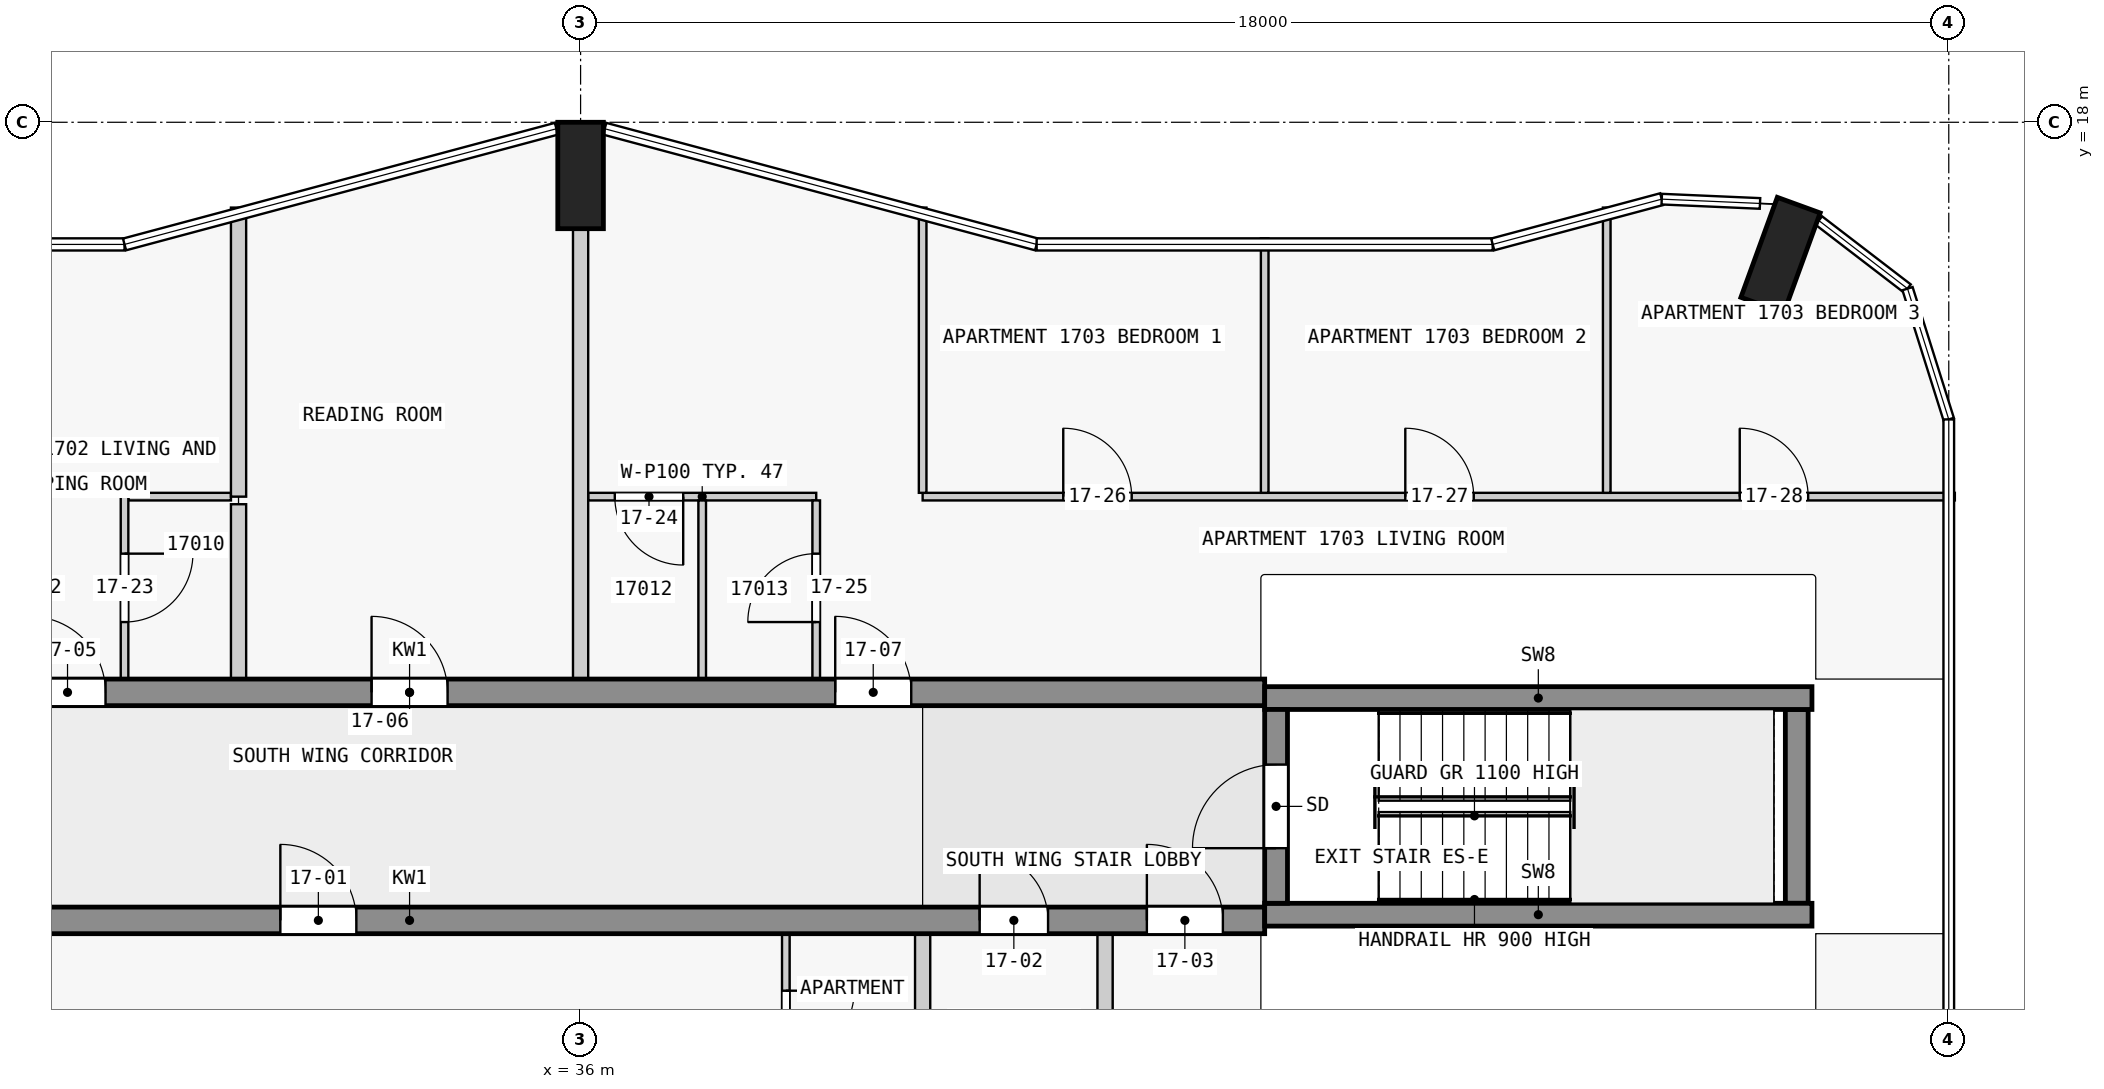
"""IFC4 building model, lengths in metres.
Left out: names, types, materials, properties, quantities, classifications, styles, units other than length and angle.
Written with IfcOpenShell. Run it as: python <this file> out.ifc"""

import sys

from ifc_helpers import new_model, si_unit, direction, frame, frame_2d, origin, origin_2d, place, context, subcontext, project, spatial, rectangle, extrude, element, fill, save


model = new_model("IFC4")
c1 = context("Model", 3, precision=1e-05, world=origin(), true_north=direction((0.0, 1.0)))
c2 = subcontext(c1, "Body", "Model", "MODEL_VIEW")
j1 = project(units=[si_unit("LENGTHUNIT", "METRE"), si_unit("PLANEANGLEUNIT", "RADIAN")], contexts=[c1])
p1 = place(None, origin())
s1 = spatial("IfcSite", under=j1, at=p1, CompositionType="ELEMENT")
p2 = place(p1, origin())
s2 = spatial("IfcBuilding", under=s1, at=p2, CompositionType="ELEMENT")
p3 = place(p2, frame((0.0, 0.0, 68.8)))
s3 = spatial("IfcBuildingStorey", under=s2, at=p3, CompositionType="ELEMENT", Elevation=68.8)
for number, where, z_axis, x_axis in (
    (1, (51.787, 16.252, 0.0), (0.0, 0.0, 1.0), (-0.94, 0.342, 0.0)),
    (2, (36.0, 17.3, 0.0), (0.0, 0.0, 1.0), (1.0, 0.0, 0.0)),
):
    element("IfcColumn", number, at=place(p3, frame(where, z_axis=z_axis, x_axis=x_axis)), inside=s3, PredefinedType="COLUMN", context=c2, shape_type="SweptSolid", body=[
        extrude(rectangle(XDim=0.6, YDim=1.4, at=origin_2d()), origin(), (0.0, 0.0, 1.0), 3.5),
    ])
p4 = place(p3, frame((45.15, 7.725, 0.0), z_axis=(0.0, 0.0, 1.0), x_axis=(0.0, 1.0, 0.0)))
e3 = element("IfcWall", 3, at=p4, inside=s3, PredefinedType="SHEAR", context=c2, shape_type="SweptSolid", body=[
    extrude(rectangle(XDim=2.55, YDim=0.3, at=frame_2d((1.275, 0.0))), origin(), (0.0, 0.0, 1.0), 3.5),
])
p5 = place(p4, frame((0.725, 0.0, 0.0)))
e4 = element("IfcOpeningElement", 4, at=p5, cuts=e3, PredefinedType="OPENING", context=c2, shape_type="SweptSolid", body=[
    extrude(rectangle(XDim=1.1, YDim=2.1, at=frame_2d((0.55, 1.05))), frame((0.0, 0.16, 0.0), z_axis=(0.0, -1.0, 0.0), x_axis=(1.0, 0.0, 0.0)), (0.0, 0.0, 1.0), 0.32),
])
p6 = place(p3, frame((52.0, 7.725, 0.0), z_axis=(0.0, 0.0, 1.0), x_axis=(0.0, 1.0, 0.0)))
e5 = element("IfcWall", 5, at=p6, inside=s3, PredefinedType="SHEAR", context=c2, shape_type="SweptSolid", body=[
    extrude(rectangle(XDim=2.55, YDim=0.3, at=frame_2d((1.275, 0.0))), origin(), (0.0, 0.0, 1.0), 3.5),
])
for number, where, z_axis, x_axis in (
    (6, (45.0, 7.575, 0.0), (0.0, 0.0, 1.0), (1.0, 0.0, 0.0)),
    (7, (45.0, 10.425, 0.0), (0.0, 0.0, 1.0), (1.0, 0.0, 0.0)),
):
    element("IfcWall", number, at=place(p3, frame(where, z_axis=z_axis, x_axis=x_axis)), inside=s3, PredefinedType="SHEAR", context=c2, shape_type="SweptSolid", body=[
        extrude(rectangle(XDim=7.2, YDim=0.3, at=frame_2d((3.6, 0.0))), origin(), (0.0, 0.0, 1.0), 3.5),
    ])
p7 = place(p3, frame((22.5, 7.5, 0.0), z_axis=(0.0, 0.0, 1.0), x_axis=(1.0, 0.0, 0.0)))
e8 = element("IfcWall", 8, at=p7, inside=s3, PredefinedType="SHEAR", context=c2, shape_type="SweptSolid", body=[
    extrude(rectangle(XDim=22.5, YDim=0.35, at=frame_2d((11.25, 0.0))), origin(), (0.0, 0.0, 1.0), 3.2),
])
p8 = place(p7, frame((9.55, 0.0, 0.0)))
e9 = element("IfcOpeningElement", 9, at=p8, cuts=e8, PredefinedType="OPENING", context=c2, shape_type="SweptSolid", body=[
    extrude(rectangle(XDim=1.0, YDim=2.1, at=frame_2d((0.5, 1.05))), frame((0.0, 0.185, 0.0), z_axis=(0.0, -1.0, 0.0), x_axis=(1.0, 0.0, 0.0)), (0.0, 0.0, 1.0), 0.37),
])
p9 = place(p7, frame((18.75, 0.0, 0.0)))
e10 = element("IfcOpeningElement", 10, at=p9, cuts=e8, PredefinedType="OPENING", context=c2, shape_type="SweptSolid", body=[
    extrude(rectangle(XDim=0.9, YDim=2.1, at=frame_2d((0.45, 1.05))), frame((0.0, 0.185, 0.0), z_axis=(0.0, -1.0, 0.0), x_axis=(1.0, 0.0, 0.0)), (0.0, 0.0, 1.0), 0.37),
])
p10 = place(p7, frame((20.95, 0.0, 0.0)))
e11 = element("IfcOpeningElement", 11, at=p10, cuts=e8, PredefinedType="OPENING", context=c2, shape_type="SweptSolid", body=[
    extrude(rectangle(XDim=1.0, YDim=2.1, at=frame_2d((0.5, 1.05))), frame((0.0, 0.185, 0.0), z_axis=(0.0, -1.0, 0.0), x_axis=(1.0, 0.0, 0.0)), (0.0, 0.0, 1.0), 0.37),
])
p11 = place(p3, frame((22.5, 10.5, 0.0), z_axis=(0.0, 0.0, 1.0), x_axis=(1.0, 0.0, 0.0)))
e12 = element("IfcWall", 12, at=p11, inside=s3, PredefinedType="SHEAR", context=c2, shape_type="SweptSolid", body=[
    extrude(rectangle(XDim=22.5, YDim=0.35, at=frame_2d((11.25, 0.0))), origin(), (0.0, 0.0, 1.0), 3.2),
])
p12 = place(p11, frame((1.75, 0.0, 0.0)))
e13 = element("IfcOpeningElement", 13, at=p12, cuts=e12, PredefinedType="OPENING", context=c2, shape_type="SweptSolid", body=[
    extrude(rectangle(XDim=1.0, YDim=2.1, at=frame_2d((0.5, 1.05))), frame((0.0, 0.185, 0.0), z_axis=(0.0, -1.0, 0.0), x_axis=(1.0, 0.0, 0.0)), (0.0, 0.0, 1.0), 0.37),
])
p13 = place(p11, frame((6.25, 0.0, 0.0)))
e14 = element("IfcOpeningElement", 14, at=p13, cuts=e12, PredefinedType="OPENING", context=c2, shape_type="SweptSolid", body=[
    extrude(rectangle(XDim=1.0, YDim=2.1, at=frame_2d((0.5, 1.05))), frame((0.0, 0.185, 0.0), z_axis=(0.0, -1.0, 0.0), x_axis=(1.0, 0.0, 0.0)), (0.0, 0.0, 1.0), 0.37),
])
p14 = place(p11, frame((10.75, 0.0, 0.0)))
e15 = element("IfcOpeningElement", 15, at=p14, cuts=e12, PredefinedType="OPENING", context=c2, shape_type="SweptSolid", body=[
    extrude(rectangle(XDim=1.0, YDim=2.1, at=frame_2d((0.5, 1.05))), frame((0.0, 0.185, 0.0), z_axis=(0.0, -1.0, 0.0), x_axis=(1.0, 0.0, 0.0)), (0.0, 0.0, 1.0), 0.37),
])
p15 = place(p11, frame((16.85, 0.0, 0.0)))
e16 = element("IfcOpeningElement", 16, at=p15, cuts=e12, PredefinedType="OPENING", context=c2, shape_type="SweptSolid", body=[
    extrude(rectangle(XDim=1.0, YDim=2.1, at=frame_2d((0.5, 1.05))), frame((0.0, 0.185, 0.0), z_axis=(0.0, -1.0, 0.0), x_axis=(1.0, 0.0, 0.0)), (0.0, 0.0, 1.0), 0.37),
])
p16 = place(p3, frame((31.4, 13.075, 0.0), z_axis=(0.0, 0.0, 1.0), x_axis=(-1.0, 0.0, 0.0)))
e17 = element("IfcWall", 17, at=p16, inside=s3, PredefinedType="PARTITIONING", context=c2, shape_type="SweptSolid", body=[
    extrude(rectangle(XDim=1.35, YDim=0.1, at=frame_2d((0.675, 0.0))), origin(), (0.0, 0.0, 1.0), 3.2),
])
p17 = place(p3, frame((39.1, 13.075, 0.0), z_axis=(0.0, 0.0, 1.0), x_axis=(-1.0, 0.0, 0.0)))
e18 = element("IfcWall", 18, at=p17, inside=s3, PredefinedType="PARTITIONING", context=c2, shape_type="SweptSolid", body=[
    extrude(rectangle(XDim=3.0, YDim=0.1, at=frame_2d((1.5, 0.0))), origin(), (0.0, 0.0, 1.0), 3.2),
])
p18 = place(p17, frame((1.75, 0.0, 0.0)))
e19 = element("IfcOpeningElement", 19, at=p18, cuts=e18, PredefinedType="OPENING", context=c2, shape_type="SweptSolid", body=[
    extrude(rectangle(XDim=0.9, YDim=2.1, at=frame_2d((0.45, 1.05))), frame((0.0, 0.06, 0.0), z_axis=(0.0, -1.0, 0.0), x_axis=(1.0, 0.0, 0.0)), (0.0, 0.0, 1.0), 0.12),
])
p19 = place(p3, frame((40.5, 13.075, 0.0), z_axis=(0.0, 0.0, 1.0), x_axis=(1.0, 0.0, 0.0)))
e20 = element("IfcWall", 20, at=p19, inside=s3, PredefinedType="PARTITIONING", context=c2, shape_type="SweptSolid", body=[
    extrude(rectangle(XDim=13.58, YDim=0.1, at=frame_2d((6.79, 0.0))), origin(), (0.0, 0.0, 1.0), 3.2),
])
p20 = place(p19, frame((1.85, 0.0, 0.0)))
e21 = element("IfcOpeningElement", 21, at=p20, cuts=e20, PredefinedType="OPENING", context=c2, shape_type="SweptSolid", body=[
    extrude(rectangle(XDim=0.9, YDim=2.1, at=frame_2d((0.45, 1.05))), frame((0.0, 0.06, 0.0), z_axis=(0.0, -1.0, 0.0), x_axis=(1.0, 0.0, 0.0)), (0.0, 0.0, 1.0), 0.12),
])
p21 = place(p19, frame((6.35, 0.0, 0.0)))
e22 = element("IfcOpeningElement", 22, at=p21, cuts=e20, PredefinedType="OPENING", context=c2, shape_type="SweptSolid", body=[
    extrude(rectangle(XDim=0.9, YDim=2.1, at=frame_2d((0.45, 1.05))), frame((0.0, 0.06, 0.0), z_axis=(0.0, -1.0, 0.0), x_axis=(1.0, 0.0, 0.0)), (0.0, 0.0, 1.0), 0.12),
])
p22 = place(p19, frame((10.75, 0.0, 0.0)))
e23 = element("IfcOpeningElement", 23, at=p22, cuts=e20, PredefinedType="OPENING", context=c2, shape_type="SweptSolid", body=[
    extrude(rectangle(XDim=0.9, YDim=2.1, at=frame_2d((0.45, 1.05))), frame((0.0, 0.06, 0.0), z_axis=(0.0, -1.0, 0.0), x_axis=(1.0, 0.0, 0.0)), (0.0, 0.0, 1.0), 0.12),
])
p23 = place(p3, frame((30.0, 13.075, 0.0), z_axis=(0.0, 0.0, 1.0), x_axis=(0.0, -1.0, 0.0)))
e24 = element("IfcWall", 24, at=p23, inside=s3, PredefinedType="PARTITIONING", context=c2, shape_type="SweptSolid", body=[
    extrude(rectangle(XDim=2.4, YDim=0.1, at=frame_2d((1.2, 0.0))), origin(), (0.0, 0.0, 1.0), 3.2),
])
p24 = place(p23, frame((0.75, 0.0, 0.0)))
e25 = element("IfcOpeningElement", 25, at=p24, cuts=e24, PredefinedType="OPENING", context=c2, shape_type="SweptSolid", body=[
    extrude(rectangle(XDim=0.9, YDim=2.1, at=frame_2d((0.45, 1.05))), frame((0.0, 0.06, 0.0), z_axis=(0.0, -1.0, 0.0), x_axis=(1.0, 0.0, 0.0)), (0.0, 0.0, 1.0), 0.12),
])
p25 = place(p3, frame((31.5, 16.878, 0.0), z_axis=(0.0, 0.0, 1.0), x_axis=(0.0, -1.0, 0.0)))
e26 = element("IfcWall", 26, at=p25, inside=s3, PredefinedType="PARTITIONING", context=c2, shape_type="SweptSolid", body=[
    extrude(rectangle(XDim=3.803, YDim=0.2, at=frame_2d((1.901, 0.0))), origin(), (0.0, 0.0, 1.0), 3.2),
])
p26 = place(p3, frame((31.5, 10.675, 0.0), z_axis=(0.0, 0.0, 1.0), x_axis=(0.0, 1.0, 0.0)))
e27 = element("IfcWall", 27, at=p26, inside=s3, PredefinedType="PARTITIONING", context=c2, shape_type="SweptSolid", body=[
    extrude(rectangle(XDim=2.3, YDim=0.2, at=frame_2d((1.15, 0.0))), origin(), (0.0, 0.0, 1.0), 3.2),
])
p27 = place(p3, frame((36.0, 10.675, 0.0), z_axis=(0.0, 0.0, 1.0), x_axis=(0.0, 1.0, 0.0)))
e28 = element("IfcWall", 28, at=p27, inside=s3, PredefinedType="PARTITIONING", context=c2, shape_type="SweptSolid", body=[
    extrude(rectangle(XDim=5.925, YDim=0.2, at=frame_2d((2.962, 0.0))), origin(), (0.0, 0.0, 1.0), 3.2),
])
p28 = place(p3, frame((37.6, 10.675, 0.0), z_axis=(0.0, 0.0, 1.0), x_axis=(0.0, 1.0, 0.0)))
e29 = element("IfcWall", 29, at=p28, inside=s3, PredefinedType="PARTITIONING", context=c2, shape_type="SweptSolid", body=[
    extrude(rectangle(XDim=2.35, YDim=0.1, at=frame_2d((1.175, 0.0))), origin(), (0.0, 0.0, 1.0), 3.2),
])
p29 = place(p3, frame((38.7, 7.325, 0.0), z_axis=(0.0, 0.0, 1.0), x_axis=(0.0, -1.0, 0.0)))
e30 = element("IfcWall", 30, at=p29, inside=s3, PredefinedType="PARTITIONING", context=c2, shape_type="SweptSolid", body=[
    extrude(rectangle(XDim=2.35, YDim=0.1, at=frame_2d((1.175, 0.0))), origin(), (0.0, 0.0, 1.0), 3.2),
])
p30 = place(p29, frame((0.75, 0.0, 0.0)))
e31 = element("IfcOpeningElement", 31, at=p30, cuts=e30, PredefinedType="OPENING", context=c2, shape_type="SweptSolid", body=[
    extrude(rectangle(XDim=0.9, YDim=2.1, at=frame_2d((0.45, 1.05))), frame((0.0, 0.06, 0.0), z_axis=(0.0, -1.0, 0.0), x_axis=(1.0, 0.0, 0.0)), (0.0, 0.0, 1.0), 0.12),
])
p31 = place(p3, frame((39.1, 10.675, 0.0), z_axis=(0.0, 0.0, 1.0), x_axis=(0.0, 1.0, 0.0)))
e32 = element("IfcWall", 32, at=p31, inside=s3, PredefinedType="PARTITIONING", context=c2, shape_type="SweptSolid", body=[
    extrude(rectangle(XDim=2.35, YDim=0.1, at=frame_2d((1.175, 0.0))), origin(), (0.0, 0.0, 1.0), 3.2),
])
p32 = place(p31, frame((0.75, 0.0, 0.0)))
e33 = element("IfcOpeningElement", 33, at=p32, cuts=e32, PredefinedType="OPENING", context=c2, shape_type="SweptSolid", body=[
    extrude(rectangle(XDim=0.9, YDim=2.1, at=frame_2d((0.45, 1.05))), frame((0.0, 0.06, 0.0), z_axis=(0.0, -1.0, 0.0), x_axis=(1.0, 0.0, 0.0)), (0.0, 0.0, 1.0), 0.12),
])
p33 = place(p3, frame((40.5, 16.878, 0.0), z_axis=(0.0, 0.0, 1.0), x_axis=(0.0, -1.0, 0.0)))
e34 = element("IfcWall", 34, at=p33, inside=s3, PredefinedType="PARTITIONING", context=c2, shape_type="SweptSolid", body=[
    extrude(rectangle(XDim=3.753, YDim=0.1, at=frame_2d((1.876, 0.0))), origin(), (0.0, 0.0, 1.0), 3.2),
])
p34 = place(p3, frame((40.5, 1.122, 0.0), z_axis=(0.0, 0.0, 1.0), x_axis=(0.0, 1.0, 0.0)))
e35 = element("IfcWall", 35, at=p34, inside=s3, PredefinedType="PARTITIONING", context=c2, shape_type="SweptSolid", body=[
    extrude(rectangle(XDim=6.203, YDim=0.2, at=frame_2d((3.101, 0.0))), origin(), (0.0, 0.0, 1.0), 3.2),
])
p35 = place(p3, frame((42.9, 5.025, 0.0), z_axis=(0.0, 0.0, 1.0), x_axis=(0.0, 1.0, 0.0)))
e36 = element("IfcWall", 36, at=p35, inside=s3, PredefinedType="PARTITIONING", context=c2, shape_type="SweptSolid", body=[
    extrude(rectangle(XDim=2.3, YDim=0.2, at=frame_2d((1.15, 0.0))), origin(), (0.0, 0.0, 1.0), 3.2),
])
p36 = place(p3, frame((45.0, 13.125, 0.0), z_axis=(0.0, 0.0, 1.0), x_axis=(0.0, 1.0, 0.0)))
e37 = element("IfcWall", 37, at=p36, inside=s3, PredefinedType="PARTITIONING", context=c2, shape_type="SweptSolid", body=[
    extrude(rectangle(XDim=3.348, YDim=0.1, at=frame_2d((1.674, 0.0))), origin(), (0.0, 0.0, 1.0), 3.2),
])
p37 = place(p3, frame((49.5, 13.125, 0.0), z_axis=(0.0, 0.0, 1.0), x_axis=(0.0, 1.0, 0.0)))
e38 = element("IfcWall", 38, at=p37, inside=s3, PredefinedType="PARTITIONING", context=c2, shape_type="SweptSolid", body=[
    extrude(rectangle(XDim=3.753, YDim=0.1, at=frame_2d((1.876, 0.0))), origin(), (0.0, 0.0, 1.0), 3.2),
])
p38 = place(p5, origin())
e39 = element("IfcDoor", 39, at=p38, inside=s3, OperationType="SINGLE_SWING_LEFT", PredefinedType="DOOR", context=c2, shape_type="SweptSolid", body=[
    extrude(rectangle(XDim=1.1, YDim=2.1, at=frame_2d((0.55, 1.05))), frame((0.0, 0.025, 0.0), z_axis=(0.0, -1.0, 0.0), x_axis=(1.0, 0.0, 0.0)), (0.0, 0.0, 1.0), 0.05),
])
fill(e4, e39)
p39 = place(p8, origin())
e40 = element("IfcDoor", 40, at=p39, inside=s3, OperationType="SINGLE_SWING_LEFT", PredefinedType="DOOR", context=c2, shape_type="SweptSolid", body=[
    extrude(rectangle(XDim=1.0, YDim=2.1, at=frame_2d((0.5, 1.05))), frame((0.0, 0.025, 0.0), z_axis=(0.0, -1.0, 0.0), x_axis=(1.0, 0.0, 0.0)), (0.0, 0.0, 1.0), 0.05),
])
fill(e9, e40)
p40 = place(p9, origin())
e41 = element("IfcDoor", 41, at=p40, inside=s3, OperationType="SINGLE_SWING_RIGHT", PredefinedType="DOOR", context=c2, shape_type="SweptSolid", body=[
    extrude(rectangle(XDim=0.9, YDim=2.1, at=frame_2d((0.45, 1.05))), frame((0.0, 0.025, 0.0), z_axis=(0.0, -1.0, 0.0), x_axis=(1.0, 0.0, 0.0)), (0.0, 0.0, 1.0), 0.05),
])
fill(e10, e41)
p41 = place(p10, origin())
e42 = element("IfcDoor", 42, at=p41, inside=s3, OperationType="SINGLE_SWING_RIGHT", PredefinedType="DOOR", context=c2, shape_type="SweptSolid", body=[
    extrude(rectangle(XDim=1.0, YDim=2.1, at=frame_2d((0.5, 1.05))), frame((0.0, 0.025, 0.0), z_axis=(0.0, -1.0, 0.0), x_axis=(1.0, 0.0, 0.0)), (0.0, 0.0, 1.0), 0.05),
])
fill(e11, e42)
p42 = place(p13, origin())
e43 = element("IfcDoor", 43, at=p42, inside=s3, OperationType="SINGLE_SWING_LEFT", PredefinedType="DOOR", context=c2, shape_type="SweptSolid", body=[
    extrude(rectangle(XDim=1.0, YDim=2.1, at=frame_2d((0.5, 1.05))), frame((0.0, 0.025, 0.0), z_axis=(0.0, -1.0, 0.0), x_axis=(1.0, 0.0, 0.0)), (0.0, 0.0, 1.0), 0.05),
])
fill(e14, e43)
p43 = place(p14, origin())
e44 = element("IfcDoor", 44, at=p43, inside=s3, OperationType="SINGLE_SWING_LEFT", PredefinedType="DOOR", context=c2, shape_type="SweptSolid", body=[
    extrude(rectangle(XDim=1.0, YDim=2.1, at=frame_2d((0.5, 1.05))), frame((0.0, 0.025, 0.0), z_axis=(0.0, -1.0, 0.0), x_axis=(1.0, 0.0, 0.0)), (0.0, 0.0, 1.0), 0.05),
])
fill(e15, e44)
p44 = place(p15, origin())
e45 = element("IfcDoor", 45, at=p44, inside=s3, OperationType="SINGLE_SWING_RIGHT", PredefinedType="DOOR", context=c2, shape_type="SweptSolid", body=[
    extrude(rectangle(XDim=1.0, YDim=2.1, at=frame_2d((0.5, 1.05))), frame((0.0, 0.025, 0.0), z_axis=(0.0, -1.0, 0.0), x_axis=(1.0, 0.0, 0.0)), (0.0, 0.0, 1.0), 0.05),
])
fill(e16, e45)
p45 = place(p30, origin())
e46 = element("IfcDoor", 46, at=p45, inside=s3, OperationType="SINGLE_SWING_RIGHT", PredefinedType="DOOR", context=c2, shape_type="SweptSolid", body=[
    extrude(rectangle(XDim=0.9, YDim=2.1, at=frame_2d((0.45, 1.05))), frame((0.0, 0.025, 0.0), z_axis=(0.0, -1.0, 0.0), x_axis=(1.0, 0.0, 0.0)), (0.0, 0.0, 1.0), 0.05),
])
fill(e31, e46)
p46 = place(p24, origin())
e47 = element("IfcDoor", 47, at=p46, inside=s3, OperationType="SINGLE_SWING_RIGHT", PredefinedType="DOOR", context=c2, shape_type="SweptSolid", body=[
    extrude(rectangle(XDim=0.9, YDim=2.1, at=frame_2d((0.45, 1.05))), frame((0.0, 0.025, 0.0), z_axis=(0.0, -1.0, 0.0), x_axis=(1.0, 0.0, 0.0)), (0.0, 0.0, 1.0), 0.05),
])
fill(e25, e47)
p47 = place(p18, origin())
e48 = element("IfcDoor", 48, at=p47, inside=s3, OperationType="SINGLE_SWING_RIGHT", PredefinedType="DOOR", context=c2, shape_type="SweptSolid", body=[
    extrude(rectangle(XDim=0.9, YDim=2.1, at=frame_2d((0.45, 1.05))), frame((0.0, 0.025, 0.0), z_axis=(0.0, -1.0, 0.0), x_axis=(1.0, 0.0, 0.0)), (0.0, 0.0, 1.0), 0.05),
])
fill(e19, e48)
p48 = place(p32, origin())
e49 = element("IfcDoor", 49, at=p48, inside=s3, OperationType="SINGLE_SWING_RIGHT", PredefinedType="DOOR", context=c2, shape_type="SweptSolid", body=[
    extrude(rectangle(XDim=0.9, YDim=2.1, at=frame_2d((0.45, 1.05))), frame((0.0, 0.025, 0.0), z_axis=(0.0, -1.0, 0.0), x_axis=(1.0, 0.0, 0.0)), (0.0, 0.0, 1.0), 0.05),
])
fill(e33, e49)
p49 = place(p20, origin())
e50 = element("IfcDoor", 50, at=p49, inside=s3, OperationType="SINGLE_SWING_LEFT", PredefinedType="DOOR", context=c2, shape_type="SweptSolid", body=[
    extrude(rectangle(XDim=0.9, YDim=2.1, at=frame_2d((0.45, 1.05))), frame((0.0, 0.025, 0.0), z_axis=(0.0, -1.0, 0.0), x_axis=(1.0, 0.0, 0.0)), (0.0, 0.0, 1.0), 0.05),
])
fill(e21, e50)
p50 = place(p21, origin())
e51 = element("IfcDoor", 51, at=p50, inside=s3, OperationType="SINGLE_SWING_RIGHT", PredefinedType="DOOR", context=c2, shape_type="SweptSolid", body=[
    extrude(rectangle(XDim=0.9, YDim=2.1, at=frame_2d((0.45, 1.05))), frame((0.0, 0.025, 0.0), z_axis=(0.0, -1.0, 0.0), x_axis=(1.0, 0.0, 0.0)), (0.0, 0.0, 1.0), 0.05),
])
fill(e22, e51)
p51 = place(p22, origin())
e52 = element("IfcDoor", 52, at=p51, inside=s3, OperationType="SINGLE_SWING_RIGHT", PredefinedType="DOOR", context=c2, shape_type="SweptSolid", body=[
    extrude(rectangle(XDim=0.9, YDim=2.1, at=frame_2d((0.45, 1.05))), frame((0.0, 0.025, 0.0), z_axis=(0.0, -1.0, 0.0), x_axis=(1.0, 0.0, 0.0)), (0.0, 0.0, 1.0), 0.05),
])
fill(e23, e52)
save(model, sys.argv[1])
